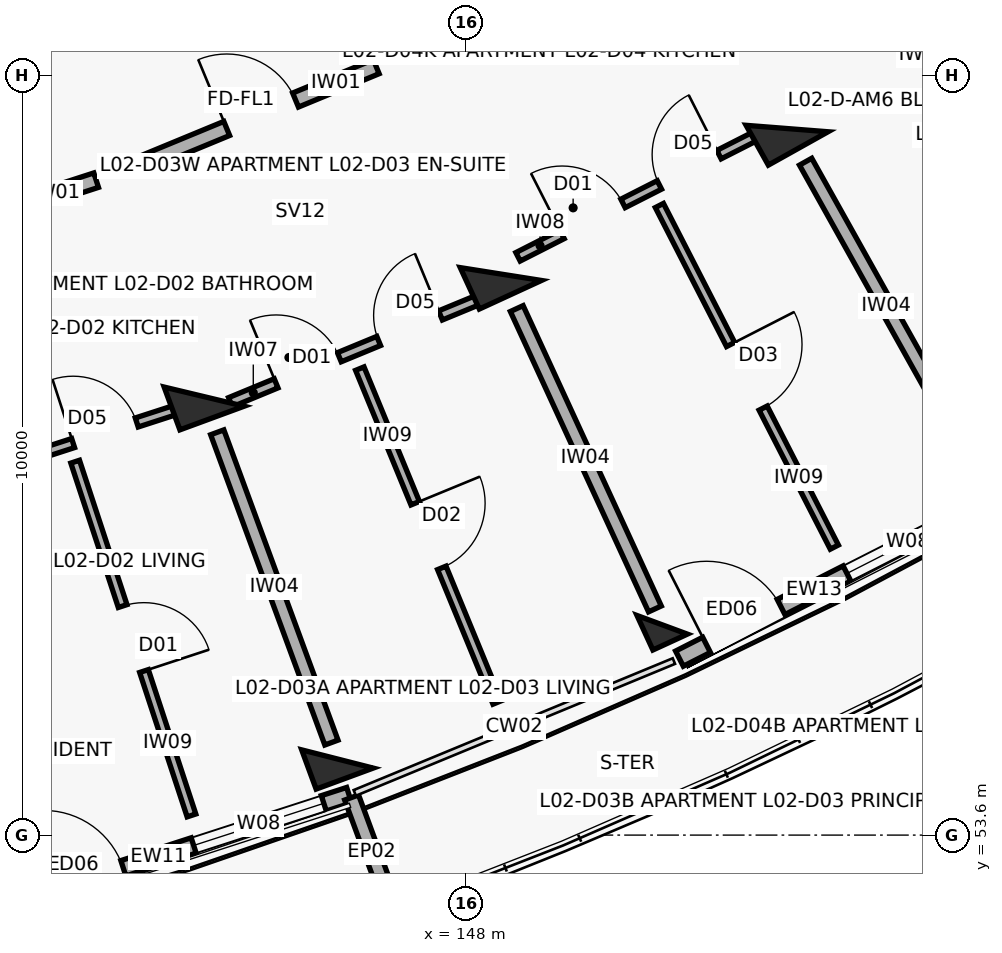
"""IFC4 building model, lengths in metres.
Left out: names, types, materials, properties, quantities, classifications, styles, units other than length and angle.
Written with IfcOpenShell. Run it as: python <this file> out.ifc"""

import sys

from ifc_helpers import new_model, si_unit, direction, frame, frame_2d, origin, origin_2d, place, context, subcontext, project, spatial, rectangle, extrude, element, fill, save


model = new_model("IFC4")
c1 = context("Model", 3, precision=1e-05, world=origin(), true_north=direction((0.0, 1.0)))
c2 = subcontext(c1, "Body", "Model", "MODEL_VIEW")
j1 = project(units=[si_unit("LENGTHUNIT", "METRE"), si_unit("PLANEANGLEUNIT", "RADIAN")], contexts=[c1])
p1 = place(None, origin())
s1 = spatial("IfcSite", under=j1, at=p1, CompositionType="ELEMENT")
p2 = place(p1, origin())
s2 = spatial("IfcBuilding", under=s1, at=p2, CompositionType="ELEMENT")
p3 = place(p2, frame((0.0, 0.0, 8.1)))
s3 = spatial("IfcBuildingStorey", under=s2, at=p3, CompositionType="ELEMENT", Elevation=8.1)
p4 = place(p3, frame((144.557, 59.369, 0.0), z_axis=(0.0, 0.0, 1.0), x_axis=(0.345298198999, -0.93849302276, 0.0)))
e1 = element("IfcColumn", 1, at=p4, inside=s3, PredefinedType="COLUMN", context=c2, shape_type="SweptSolid", body=[
    extrude(rectangle(XDim=0.6, YDim=0.9, at=origin_2d()), origin(), (0.0, 0.0, 1.0), 3.1),
])
p5 = place(p3, frame((146.311, 54.602, 0.0), z_axis=(0.0, 0.0, 1.0), x_axis=(0.345298198999, -0.93849302276, 0.0)))
e2 = element("IfcColumn", 2, at=p5, inside=s3, PredefinedType="COLUMN", context=c2, shape_type="SweptSolid", body=[
    extrude(rectangle(XDim=0.55, YDim=0.8, at=origin_2d()), origin(), (0.0, 0.0, 1.0), 3.1),
])
p6 = place(p3, frame((148.461, 60.982, 0.0), z_axis=(0.0, 0.0, 1.0), x_axis=(0.417867073801, -0.908508177527, 0.0)))
e3 = element("IfcColumn", 3, at=p6, inside=s3, PredefinedType="COLUMN", context=c2, shape_type="SweptSolid", body=[
    extrude(rectangle(XDim=0.6, YDim=0.9, at=origin_2d()), origin(), (0.0, 0.0, 1.0), 3.1),
])
p7 = place(p3, frame((150.584, 56.367, 0.0), z_axis=(0.0, 0.0, 1.0), x_axis=(0.417867073801, -0.908508177527, 0.0)))
e4 = element("IfcColumn", 4, at=p7, inside=s3, PredefinedType="COLUMN", context=c2, shape_type="SweptSolid", body=[
    extrude(rectangle(XDim=0.5, YDim=0.5, at=origin_2d()), origin(), (0.0, 0.0, 1.0), 3.1),
])
p8 = place(p3, frame((152.227, 62.897, 0.0), z_axis=(0.0, 0.0, 1.0), x_axis=(0.487859659139, -0.87292207727, 0.0)))
e5 = element("IfcColumn", 5, at=p8, inside=s3, PredefinedType="COLUMN", context=c2, shape_type="SweptSolid", body=[
    extrude(rectangle(XDim=0.6, YDim=0.9, at=origin_2d()), origin(), (0.0, 0.0, 1.0), 3.1),
])
p9 = place(p3, frame((142.067, 52.701, 0.0), z_axis=(0.0, 0.0, 1.0), x_axis=(0.951311584867, 0.308230868826, 0.0)))
e6 = element("IfcWall", 6, at=p9, inside=s3, PredefinedType="SOLIDWALL", context=c2, shape_type="SweptSolid", body=[
    extrude(rectangle(XDim=4.623, YDim=0.212, at=frame_2d((2.311, 0.0))), origin(), (0.0, 0.0, 1.0), 2.25),
])
p10 = place(p9, frame((0.4, 0.0, 0.0)))
e7 = element("IfcOpeningElement", 7, at=p10, cuts=e6, PredefinedType="OPENING", context=c2, shape_type="SweptSolid", body=[
    extrude(rectangle(XDim=1.1, YDim=2.15, at=frame_2d((0.55, 1.075))), frame((0.0, 0.116, 0.0), z_axis=(0.0, -1.0, 0.0), x_axis=(1.0, 0.0, 0.0)), (0.0, 0.0, 1.0), 0.232),
])
p11 = place(p9, frame((2.472, 0.0, 0.35)))
e8 = element("IfcOpeningElement", 8, at=p11, cuts=e6, PredefinedType="OPENING", context=c2, shape_type="SweptSolid", body=[
    extrude(rectangle(XDim=1.8, YDim=1.65, at=frame_2d((0.9, 0.825))), frame((0.0, 0.116, 0.0), z_axis=(0.0, -1.0, 0.0), x_axis=(1.0, 0.0, 0.0)), (0.0, 0.0, 1.0), 0.232),
])
p12 = place(p3, frame((146.498, 54.095, 0.0), z_axis=(0.0, 0.0, 1.0), x_axis=(0.345328180406, -0.938481991206, 0.0)))
e9 = element("IfcWall", 9, at=p12, inside=s3, PredefinedType="PARAPET", context=c2, shape_type="SweptSolid", body=[
    extrude(rectangle(XDim=1.53, YDim=0.195, at=frame_2d((0.765, 0.0))), origin(), (0.0, 0.0, 1.0), 2.25),
])
p13 = place(p3, frame((150.811, 55.922, 0.0), z_axis=(0.0, 0.0, 1.0), x_axis=(0.891407190547, 0.453203288428, 0.0)))
e10 = element("IfcWall", 10, at=p13, inside=s3, PredefinedType="SOLIDWALL", context=c2, shape_type="SweptSolid", body=[
    extrude(rectangle(XDim=4.623, YDim=0.224, at=frame_2d((2.311, 0.0))), origin(), (0.0, 0.0, 1.0), 2.25),
])
p14 = place(p13, frame((0.4, 0.0, 0.0)))
e11 = element("IfcOpeningElement", 11, at=p14, cuts=e10, PredefinedType="OPENING", context=c2, shape_type="SweptSolid", body=[
    extrude(rectangle(XDim=1.1, YDim=2.15, at=frame_2d((0.55, 1.075))), frame((0.0, 0.122, 0.0), z_axis=(0.0, -1.0, 0.0), x_axis=(1.0, 0.0, 0.0)), (0.0, 0.0, 1.0), 0.244),
])
p15 = place(p13, frame((2.472, 0.0, 0.35)))
e12 = element("IfcOpeningElement", 12, at=p15, cuts=e10, PredefinedType="OPENING", context=c2, shape_type="SweptSolid", body=[
    extrude(rectangle(XDim=1.8, YDim=1.65, at=frame_2d((0.9, 0.825))), frame((0.0, 0.122, 0.0), z_axis=(0.0, -1.0, 0.0), x_axis=(1.0, 0.0, 0.0)), (0.0, 0.0, 1.0), 0.244),
])
p16 = place(p3, frame((140.019, 61.208, 0.0), z_axis=(0.0, 0.0, 1.0), x_axis=(0.951323803878, 0.308193154005, 0.0)))
e13 = element("IfcWall", 13, at=p16, inside=s3, PredefinedType="SOLIDWALL", context=c2, shape_type="SweptSolid", body=[
    extrude(rectangle(XDim=3.277, YDim=0.2, at=frame_2d((1.639, 0.0))), origin(), (0.0, 0.0, 1.0), 2.08),
])
p17 = place(p16, frame((1.128, 0.0, 0.0)))
e14 = element("IfcOpeningElement", 14, at=p17, cuts=e13, PredefinedType="OPENING", context=c2, shape_type="SweptSolid", body=[
    extrude(rectangle(XDim=1.02, YDim=2.15, at=frame_2d((0.51, 1.075))), frame((0.0, 0.11, 0.0), z_axis=(0.0, -1.0, 0.0), x_axis=(1.0, 0.0, 0.0)), (0.0, 0.0, 1.0), 0.22),
])
p18 = place(p3, frame((140.837, 58.112, 0.0), z_axis=(0.0, 0.0, 1.0), x_axis=(0.951327366371, 0.308182157164, 0.0)))
e15 = element("IfcWall", 15, at=p18, inside=s3, PredefinedType="PARTITIONING", context=c2, shape_type="SweptSolid", body=[
    extrude(rectangle(XDim=3.628, YDim=0.125, at=frame_2d((1.814, 0.0))), origin(), (0.0, 0.0, 1.0), 2.08),
])
p19 = place(p18, frame((0.65, 0.0, 0.0)))
e16 = element("IfcOpeningElement", 16, at=p19, cuts=e15, PredefinedType="OPENING", context=c2, shape_type="SweptSolid", body=[
    extrude(rectangle(XDim=0.9, YDim=2.1, at=frame_2d((0.45, 1.05))), frame((0.0, 0.073, 0.0), z_axis=(0.0, -1.0, 0.0), x_axis=(1.0, 0.0, 0.0)), (0.0, 0.0, 1.0), 0.145),
])
p20 = place(p18, frame((2.098, 0.0, 0.0)))
e17 = element("IfcOpeningElement", 17, at=p20, cuts=e15, PredefinedType="OPENING", context=c2, shape_type="SweptSolid", body=[
    extrude(rectangle(XDim=0.88, YDim=2.1, at=frame_2d((0.44, 1.05))), frame((0.0, 0.073, 0.0), z_axis=(0.0, -1.0, 0.0), x_axis=(1.0, 0.0, 0.0)), (0.0, 0.0, 1.0), 0.145),
])
p21 = place(p3, frame((142.86, 58.513, 0.0), z_axis=(0.0, 0.0, 1.0), x_axis=(0.312308755556, -0.949980653068, 0.0)))
e18 = element("IfcWall", 18, at=p21, inside=s3, PredefinedType="PARTITIONING", context=c2, shape_type="SweptSolid", body=[
    extrude(rectangle(XDim=4.9, YDim=0.12, at=frame_2d((2.45, 0.0))), origin(), (0.0, 0.0, 1.0), 2.08),
])
p22 = place(p21, frame((2.0, 0.0, 0.0)))
e19 = element("IfcOpeningElement", 19, at=p22, cuts=e18, PredefinedType="OPENING", context=c2, shape_type="SweptSolid", body=[
    extrude(rectangle(XDim=0.9, YDim=2.1, at=frame_2d((0.45, 1.05))), frame((0.0, 0.07, 0.0), z_axis=(0.0, -1.0, 0.0), x_axis=(1.0, 0.0, 0.0)), (0.0, 0.0, 1.0), 0.14),
])
p23 = place(p3, frame((143.793, 62.459, 0.0), z_axis=(0.0, 0.0, 1.0), x_axis=(0.924214561665, 0.381873596896, 0.0)))
e20 = element("IfcWall", 20, at=p23, inside=s3, PredefinedType="SOLIDWALL", context=c2, shape_type="SweptSolid", body=[
    extrude(rectangle(XDim=3.277, YDim=0.2, at=frame_2d((1.639, 0.0))), origin(), (0.0, 0.0, 1.0), 2.08),
])
p24 = place(p23, frame((1.148, 0.0, 0.0)))
e21 = element("IfcOpeningElement", 21, at=p24, cuts=e20, PredefinedType="OPENING", context=c2, shape_type="SweptSolid", body=[
    extrude(rectangle(XDim=0.98, YDim=2.15, at=frame_2d((0.49, 1.075))), frame((0.0, 0.11, 0.0), z_axis=(0.0, -1.0, 0.0), x_axis=(1.0, 0.0, 0.0)), (0.0, 0.0, 1.0), 0.22),
])
p25 = place(p3, frame((144.903, 59.296, 0.0), z_axis=(0.0, 0.0, 1.0), x_axis=(0.924207914011, 0.381889685223, 0.0)))
e22 = element("IfcWall", 22, at=p25, inside=s3, PredefinedType="PARTITIONING", context=c2, shape_type="SweptSolid", body=[
    extrude(rectangle(XDim=3.64, YDim=0.13, at=frame_2d((1.82, 0.0))), origin(), (0.0, 0.0, 1.0), 2.08),
])
p26 = place(p25, frame((0.65, 0.0, 0.0)))
e23 = element("IfcOpeningElement", 23, at=p26, cuts=e22, PredefinedType="OPENING", context=c2, shape_type="SweptSolid", body=[
    extrude(rectangle(XDim=0.9, YDim=2.1, at=frame_2d((0.45, 1.05))), frame((0.0, 0.075, 0.0), z_axis=(0.0, -1.0, 0.0), x_axis=(1.0, 0.0, 0.0)), (0.0, 0.0, 1.0), 0.15),
])
p27 = place(p25, frame((2.11, 0.0, 0.0)))
e24 = element("IfcOpeningElement", 24, at=p27, cuts=e22, PredefinedType="OPENING", context=c2, shape_type="SweptSolid", body=[
    extrude(rectangle(XDim=0.88, YDim=2.1, at=frame_2d((0.44, 1.05))), frame((0.0, 0.075, 0.0), z_axis=(0.0, -1.0, 0.0), x_axis=(1.0, 0.0, 0.0)), (0.0, 0.0, 1.0), 0.15),
])
p28 = place(p3, frame((146.605, 59.738, 0.0), z_axis=(0.0, 0.0, 1.0), x_axis=(0.380553327256, -0.924758976769, 0.0)))
e25 = element("IfcWall", 25, at=p28, inside=s3, PredefinedType="PARTITIONING", context=c2, shape_type="SweptSolid", body=[
    extrude(rectangle(XDim=4.75, YDim=0.12, at=frame_2d((2.375, 0.0))), origin(), (0.0, 0.0, 1.0), 2.08),
])
p29 = place(p28, frame((1.915, 0.0, 0.0)))
e26 = element("IfcOpeningElement", 26, at=p29, cuts=e25, PredefinedType="OPENING", context=c2, shape_type="SweptSolid", body=[
    extrude(rectangle(XDim=0.92, YDim=2.1, at=frame_2d((0.46, 1.05))), frame((0.0, 0.07, 0.0), z_axis=(0.0, -1.0, 0.0), x_axis=(1.0, 0.0, 0.0)), (0.0, 0.0, 1.0), 0.14),
])
p30 = place(p3, frame((144.73, 58.9, 0.0), z_axis=(0.0, 0.0, 1.0), x_axis=(0.345273579683, -0.938502080537, 0.0)))
e27 = element("IfcWall", 27, at=p30, inside=s3, PredefinedType="SOLIDWALL", context=c2, shape_type="SweptSolid", body=[
    extrude(rectangle(XDim=4.35, YDim=0.185, at=frame_2d((2.175, 0.0))), origin(), (0.0, 0.0, 1.0), 2.08),
])
p31 = place(p3, frame((148.687, 61.209, 0.0), z_axis=(0.0, 0.0, 1.0), x_axis=(0.891396224028, 0.453224857866, 0.0)))
e28 = element("IfcWall", 28, at=p31, inside=s3, PredefinedType="PARTITIONING", context=c2, shape_type="SweptSolid", body=[
    extrude(rectangle(XDim=3.617, YDim=0.125, at=frame_2d((1.808, 0.0))), origin(), (0.0, 0.0, 1.0), 2.08),
])
p32 = place(p31, frame((0.65, 0.0, 0.0)))
e29 = element("IfcOpeningElement", 29, at=p32, cuts=e28, PredefinedType="OPENING", context=c2, shape_type="SweptSolid", body=[
    extrude(rectangle(XDim=0.9, YDim=2.1, at=frame_2d((0.45, 1.05))), frame((0.0, 0.073, 0.0), z_axis=(0.0, -1.0, 0.0), x_axis=(1.0, 0.0, 0.0)), (0.0, 0.0, 1.0), 0.145),
])
p33 = place(p31, frame((2.086, 0.0, 0.0)))
e30 = element("IfcOpeningElement", 30, at=p33, cuts=e28, PredefinedType="OPENING", context=c2, shape_type="SweptSolid", body=[
    extrude(rectangle(XDim=0.88, YDim=2.1, at=frame_2d((0.44, 1.05))), frame((0.0, 0.073, 0.0), z_axis=(0.0, -1.0, 0.0), x_axis=(1.0, 0.0, 0.0)), (0.0, 0.0, 1.0), 0.145),
])
p34 = place(p3, frame((150.547, 61.884, 0.0), z_axis=(0.0, 0.0, 1.0), x_axis=(0.455778725258, -0.89009311513, 0.0)))
e31 = element("IfcWall", 31, at=p34, inside=s3, PredefinedType="PARTITIONING", context=c2, shape_type="SweptSolid", body=[
    extrude(rectangle(XDim=5.05, YDim=0.12, at=frame_2d((2.525, 0.0))), origin(), (0.0, 0.0, 1.0), 2.08),
])
p35 = place(p34, frame((2.055, 0.0, 0.0)))
e32 = element("IfcOpeningElement", 32, at=p35, cuts=e31, PredefinedType="OPENING", context=c2, shape_type="SweptSolid", body=[
    extrude(rectangle(XDim=0.94, YDim=2.1, at=frame_2d((0.47, 1.05))), frame((0.0, 0.07, 0.0), z_axis=(0.0, -1.0, 0.0), x_axis=(1.0, 0.0, 0.0)), (0.0, 0.0, 1.0), 0.14),
])
p36 = place(p3, frame((148.67, 60.528, 0.0), z_axis=(0.0, 0.0, 1.0), x_axis=(0.417837051164, -0.908521985796, 0.0)))
e33 = element("IfcWall", 33, at=p36, inside=s3, PredefinedType="SOLIDWALL", context=c2, shape_type="SweptSolid", body=[
    extrude(rectangle(XDim=4.35, YDim=0.185, at=frame_2d((2.175, 0.0))), origin(), (0.0, 0.0, 1.0), 2.08),
])
p37 = place(p3, frame((152.448, 66.442, 0.0), z_axis=(0.0, 0.0, 1.0), x_axis=(0.520511872578, -0.853854431683, 0.0)))
e34 = element("IfcWall", 34, at=p37, inside=s3, PredefinedType="PARTITIONING", context=c2, shape_type="SweptSolid", body=[
    extrude(rectangle(XDim=7.95, YDim=0.14, at=frame_2d((3.975, 0.0))), origin(), (0.0, 0.0, 1.0), 2.08),
])
p38 = place(p37, frame((6.05, 0.0, 0.0)))
e35 = element("IfcOpeningElement", 35, at=p38, cuts=e34, PredefinedType="OPENING", context=c2, shape_type="SweptSolid", body=[
    extrude(rectangle(XDim=0.92, YDim=2.1, at=frame_2d((0.46, 1.05))), frame((0.0, 0.08, 0.0), z_axis=(0.0, -1.0, 0.0), x_axis=(1.0, 0.0, 0.0)), (0.0, 0.0, 1.0), 0.16),
])
p39 = place(p3, frame((152.471, 62.46, 0.0), z_axis=(0.0, 0.0, 1.0), x_axis=(0.487866639184, -0.872918176218, 0.0)))
e36 = element("IfcWall", 36, at=p39, inside=s3, PredefinedType="SOLIDWALL", context=c2, shape_type="SweptSolid", body=[
    extrude(rectangle(XDim=4.35, YDim=0.185, at=frame_2d((2.175, 0.0))), origin(), (0.0, 0.0, 1.0), 2.08),
])
p40 = place(p10, origin())
e37 = element("IfcDoor", 37, at=p40, inside=s3, OperationType="SINGLE_SWING_LEFT", PredefinedType="DOOR", context=c2, shape_type="SweptSolid", body=[
    extrude(rectangle(XDim=1.1, YDim=2.15, at=frame_2d((0.55, 1.075))), frame((0.0, 0.025, 0.0), z_axis=(0.0, -1.0, 0.0), x_axis=(1.0, 0.0, 0.0)), (0.0, 0.0, 1.0), 0.05),
])
fill(e7, e37)
p41 = place(p11, origin())
e38 = element("IfcWindow", 38, at=p41, inside=s3, PartitioningType="TRIPLE_PANEL_VERTICAL", PredefinedType="WINDOW", context=c2, shape_type="SweptSolid", body=[
    extrude(rectangle(XDim=1.8, YDim=1.65, at=frame_2d((0.9, 0.825))), frame((0.0, 0.03, 0.0), z_axis=(0.0, -1.0, 0.0), x_axis=(1.0, 0.0, 0.0)), (0.0, 0.0, 1.0), 0.06),
])
fill(e8, e38)
p42 = place(p14, origin())
e39 = element("IfcDoor", 39, at=p42, inside=s3, OperationType="SINGLE_SWING_LEFT", PredefinedType="DOOR", context=c2, shape_type="SweptSolid", body=[
    extrude(rectangle(XDim=1.1, YDim=2.15, at=frame_2d((0.55, 1.075))), frame((0.0, 0.025, 0.0), z_axis=(0.0, -1.0, 0.0), x_axis=(1.0, 0.0, 0.0)), (0.0, 0.0, 1.0), 0.05),
])
fill(e11, e39)
p43 = place(p15, origin())
e40 = element("IfcWindow", 40, at=p43, inside=s3, PartitioningType="TRIPLE_PANEL_VERTICAL", PredefinedType="WINDOW", context=c2, shape_type="SweptSolid", body=[
    extrude(rectangle(XDim=1.8, YDim=1.65, at=frame_2d((0.9, 0.825))), frame((0.0, 0.03, 0.0), z_axis=(0.0, -1.0, 0.0), x_axis=(1.0, 0.0, 0.0)), (0.0, 0.0, 1.0), 0.06),
])
fill(e12, e40)
p44 = place(p20, origin())
e41 = element("IfcDoor", 41, at=p44, inside=s3, OperationType="SINGLE_SWING_LEFT", PredefinedType="DOOR", context=c2, shape_type="SweptSolid", body=[
    extrude(rectangle(XDim=0.88, YDim=2.1, at=frame_2d((0.44, 1.05))), frame((0.0, 0.025, 0.0), z_axis=(0.0, -1.0, 0.0), x_axis=(1.0, 0.0, 0.0)), (0.0, 0.0, 1.0), 0.05),
])
fill(e17, e41)
p45 = place(p22, origin())
e42 = element("IfcDoor", 42, at=p45, inside=s3, OperationType="SINGLE_SWING_RIGHT", PredefinedType="DOOR", context=c2, shape_type="SweptSolid", body=[
    extrude(rectangle(XDim=0.9, YDim=2.1, at=frame_2d((0.45, 1.05))), frame((0.0, 0.025, 0.0), z_axis=(0.0, -1.0, 0.0), x_axis=(1.0, 0.0, 0.0)), (0.0, 0.0, 1.0), 0.05),
])
fill(e19, e42)
p46 = place(p24, origin())
e43 = element("IfcDoor", 43, at=p46, inside=s3, OperationType="SINGLE_SWING_LEFT", PredefinedType="DOOR", context=c2, shape_type="SweptSolid", body=[
    extrude(rectangle(XDim=0.98, YDim=2.15, at=frame_2d((0.49, 1.075))), frame((0.0, 0.025, 0.0), z_axis=(0.0, -1.0, 0.0), x_axis=(1.0, 0.0, 0.0)), (0.0, 0.0, 1.0), 0.05),
])
fill(e21, e43)
p47 = place(p26, origin())
e44 = element("IfcDoor", 44, at=p47, inside=s3, OperationType="SINGLE_SWING_LEFT", PredefinedType="DOOR", context=c2, shape_type="SweptSolid", body=[
    extrude(rectangle(XDim=0.9, YDim=2.1, at=frame_2d((0.45, 1.05))), frame((0.0, 0.025, 0.0), z_axis=(0.0, -1.0, 0.0), x_axis=(1.0, 0.0, 0.0)), (0.0, 0.0, 1.0), 0.05),
])
fill(e23, e44)
p48 = place(p27, origin())
e45 = element("IfcDoor", 45, at=p48, inside=s3, OperationType="SINGLE_SWING_RIGHT", PredefinedType="DOOR", context=c2, shape_type="SweptSolid", body=[
    extrude(rectangle(XDim=0.88, YDim=2.1, at=frame_2d((0.44, 1.05))), frame((0.0, 0.025, 0.0), z_axis=(0.0, -1.0, 0.0), x_axis=(1.0, 0.0, 0.0)), (0.0, 0.0, 1.0), 0.05),
])
fill(e24, e45)
p49 = place(p29, origin())
e46 = element("IfcDoor", 46, at=p49, inside=s3, OperationType="SINGLE_SWING_LEFT", PredefinedType="DOOR", context=c2, shape_type="SweptSolid", body=[
    extrude(rectangle(XDim=0.92, YDim=2.1, at=frame_2d((0.46, 1.05))), frame((0.0, 0.025, 0.0), z_axis=(0.0, -1.0, 0.0), x_axis=(1.0, 0.0, 0.0)), (0.0, 0.0, 1.0), 0.05),
])
fill(e26, e46)
p50 = place(p32, origin())
e47 = element("IfcDoor", 47, at=p50, inside=s3, OperationType="SINGLE_SWING_LEFT", PredefinedType="DOOR", context=c2, shape_type="SweptSolid", body=[
    extrude(rectangle(XDim=0.9, YDim=2.1, at=frame_2d((0.45, 1.05))), frame((0.0, 0.025, 0.0), z_axis=(0.0, -1.0, 0.0), x_axis=(1.0, 0.0, 0.0)), (0.0, 0.0, 1.0), 0.05),
])
fill(e29, e47)
p51 = place(p33, origin())
e48 = element("IfcDoor", 48, at=p51, inside=s3, OperationType="SINGLE_SWING_RIGHT", PredefinedType="DOOR", context=c2, shape_type="SweptSolid", body=[
    extrude(rectangle(XDim=0.88, YDim=2.1, at=frame_2d((0.44, 1.05))), frame((0.0, 0.025, 0.0), z_axis=(0.0, -1.0, 0.0), x_axis=(1.0, 0.0, 0.0)), (0.0, 0.0, 1.0), 0.05),
])
fill(e30, e48)
p52 = place(p35, origin())
e49 = element("IfcDoor", 49, at=p52, inside=s3, OperationType="SINGLE_SWING_LEFT", PredefinedType="DOOR", context=c2, shape_type="SweptSolid", body=[
    extrude(rectangle(XDim=0.94, YDim=2.1, at=frame_2d((0.47, 1.05))), frame((0.0, 0.025, 0.0), z_axis=(0.0, -1.0, 0.0), x_axis=(1.0, 0.0, 0.0)), (0.0, 0.0, 1.0), 0.05),
])
fill(e32, e49)
save(model, sys.argv[1])
